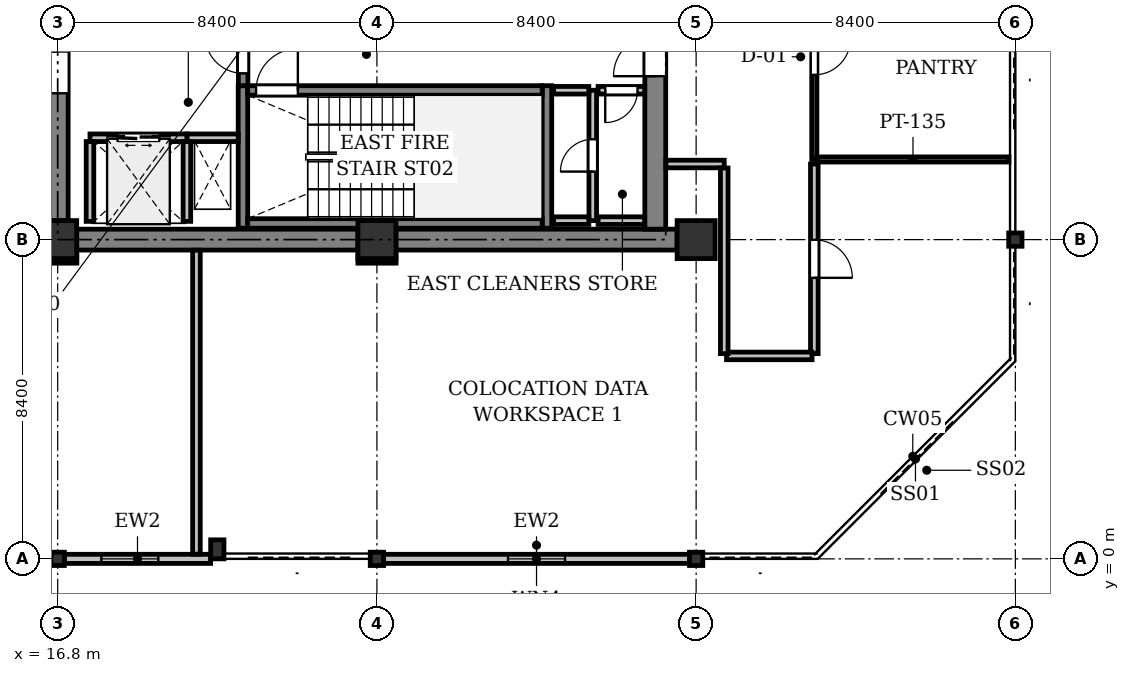
"""IFC4 building model, lengths in metres.
Left out: names, types, materials, properties, quantities, classifications, styles, units other than length and angle.
Written with IfcOpenShell. Run it as: python <this file> out.ifc"""

import sys

from ifc_helpers import new_model, si_unit, direction, frame, frame_2d, origin, origin_2d, place, context, subcontext, project, spatial, rectangle, i_section, extrude, element, fill, save


model = new_model("IFC4")
c1 = context("Model", 3, precision=1e-05, world=origin(), true_north=direction((0.0, 1.0)))
c2 = subcontext(c1, "Body", "Model", "MODEL_VIEW")
j1 = project(units=[si_unit("LENGTHUNIT", "METRE"), si_unit("PLANEANGLEUNIT", "RADIAN")], contexts=[c1])
p1 = place(None, origin())
s1 = spatial("IfcSite", under=j1, at=p1, CompositionType="ELEMENT")
p2 = place(p1, origin())
s2 = spatial("IfcBuilding", under=s1, at=p2, CompositionType="ELEMENT")
p3 = place(p2, frame((0.0, 0.0, 220.6)))
s3 = spatial("IfcBuildingStorey", under=s2, at=p3, CompositionType="ELEMENT", Elevation=220.6)
p4 = place(p3, frame((16.8, 0.0, 0.0), z_axis=(0.0, 0.0, 1.0), x_axis=(1.0, 0.0, 0.0)))
e1 = element("IfcColumn", 1, at=p4, inside=s3, PredefinedType="COLUMN", context=c2, shape_type="SweptSolid", body=[
    extrude(i_section(OverallWidth=0.35, OverallDepth=0.35, WebThickness=0.02, FlangeThickness=0.032, at=origin_2d()), origin(), (0.0, 0.0, 1.0), 4.1),
])
p5 = place(p3, frame((16.8, 8.4, 0.0), z_axis=(0.0, 0.0, 1.0), x_axis=(1.0, 0.0, 0.0)))
e2 = element("IfcColumn", 2, at=p5, inside=s3, PredefinedType="COLUMN", context=c2, shape_type="SweptSolid", body=[
    extrude(rectangle(XDim=1.0, YDim=1.0, at=origin_2d()), origin(), (0.0, 0.0, 1.0), 4.1),
])
p6 = place(p3, frame((25.2, 0.0, 0.0), z_axis=(0.0, 0.0, 1.0), x_axis=(1.0, 0.0, 0.0)))
e3 = element("IfcColumn", 3, at=p6, inside=s3, PredefinedType="COLUMN", context=c2, shape_type="SweptSolid", body=[
    extrude(i_section(OverallWidth=0.35, OverallDepth=0.35, WebThickness=0.02, FlangeThickness=0.032, at=origin_2d()), origin(), (0.0, 0.0, 1.0), 4.1),
])
p7 = place(p3, frame((25.2, 8.4, 0.0), z_axis=(0.0, 0.0, 1.0), x_axis=(1.0, 0.0, 0.0)))
e4 = element("IfcColumn", 4, at=p7, inside=s3, PredefinedType="COLUMN", context=c2, shape_type="SweptSolid", body=[
    extrude(rectangle(XDim=1.0, YDim=1.0, at=origin_2d()), origin(), (0.0, 0.0, 1.0), 4.1),
])
p8 = place(p3, frame((33.6, 0.0, 0.0), z_axis=(0.0, 0.0, 1.0), x_axis=(1.0, 0.0, 0.0)))
e5 = element("IfcColumn", 5, at=p8, inside=s3, PredefinedType="COLUMN", context=c2, shape_type="SweptSolid", body=[
    extrude(i_section(OverallWidth=0.35, OverallDepth=0.35, WebThickness=0.02, FlangeThickness=0.032, at=origin_2d()), origin(), (0.0, 0.0, 1.0), 4.1),
])
p9 = place(p3, frame((33.6, 8.4, 0.0), z_axis=(0.0, 0.0, 1.0), x_axis=(1.0, 0.0, 0.0)))
e6 = element("IfcColumn", 6, at=p9, inside=s3, PredefinedType="COLUMN", context=c2, shape_type="SweptSolid", body=[
    extrude(rectangle(XDim=1.0, YDim=1.0, at=origin_2d()), origin(), (0.0, 0.0, 1.0), 4.1),
])
p10 = place(p3, frame((42.0, 8.4, 0.0), z_axis=(0.0, 0.0, 1.0), x_axis=(1.0, 0.0, 0.0)))
e7 = element("IfcColumn", 7, at=p10, inside=s3, PredefinedType="COLUMN", context=c2, shape_type="SweptSolid", body=[
    extrude(i_section(OverallWidth=0.35, OverallDepth=0.35, WebThickness=0.02, FlangeThickness=0.032, at=origin_2d()), origin(), (0.0, 0.0, 1.0), 4.1),
])
p11 = place(p3, frame((21.0, 0.25, 0.0), z_axis=(0.0, 0.0, 1.0), x_axis=(1.0, 0.0, 0.0)))
e8 = element("IfcColumn", 8, at=p11, inside=s3, PredefinedType="PILASTER", context=c2, shape_type="SweptSolid", body=[
    extrude(rectangle(XDim=0.35, YDim=0.5, at=origin_2d()), origin(), (0.0, 0.0, 1.0), 4.1),
])
p12 = place(p3, frame((33.425, 0.0, 0.0), z_axis=(0.0, 0.0, 1.0), x_axis=(-1.0, 0.0, 0.0)))
e9 = element("IfcWall", 9, at=p12, inside=s3, PredefinedType="STANDARD", context=c2, shape_type="SweptSolid", body=[
    extrude(rectangle(XDim=8.05, YDim=0.24, at=frame_2d((4.025, 0.0))), origin(), (0.0, 0.0, 1.0), 3.525),
])
p13 = place(p12, frame((3.275, 0.0, 0.9)))
e10 = element("IfcOpeningElement", 10, at=p13, cuts=e9, PredefinedType="OPENING", context=c2, shape_type="SweptSolid", body=[
    extrude(rectangle(XDim=1.5, YDim=1.6, at=frame_2d((0.75, 0.8))), frame((0.0, 0.13, 0.0), z_axis=(0.0, -1.0, 0.0), x_axis=(1.0, 0.0, 0.0)), (0.0, 0.0, 1.0), 0.26),
])
p14 = place(p3, frame((20.825, 0.0, 0.0), z_axis=(0.0, 0.0, 1.0), x_axis=(-1.0, 0.0, 0.0)))
e11 = element("IfcWall", 11, at=p14, inside=s3, PredefinedType="STANDARD", context=c2, shape_type="SweptSolid", body=[
    extrude(rectangle(XDim=3.85, YDim=0.24, at=frame_2d((1.925, 0.0))), origin(), (0.0, 0.0, 1.0), 3.525),
])
p15 = place(p14, frame((1.377, 0.0, 0.9)))
e12 = element("IfcOpeningElement", 12, at=p15, cuts=e11, PredefinedType="OPENING", context=c2, shape_type="SweptSolid", body=[
    extrude(rectangle(XDim=1.5, YDim=1.6, at=frame_2d((0.75, 0.8))), frame((0.0, 0.13, 0.0), z_axis=(0.0, -1.0, 0.0), x_axis=(1.0, 0.0, 0.0)), (0.0, 0.0, 1.0), 0.26),
])
p16 = place(p3, frame((17.3, 8.4, 0.0), z_axis=(0.0, 0.0, 1.0), x_axis=(1.0, 0.0, 0.0)))
e13 = element("IfcWall", 13, at=p16, inside=s3, PredefinedType="SHEAR", context=c2, shape_type="SweptSolid", body=[
    extrude(rectangle(XDim=7.4, YDim=0.55, at=frame_2d((3.7, 0.0))), origin(), (0.0, 0.0, 1.0), 3.825),
])
p17 = place(p3, frame((25.7, 8.4, 0.0), z_axis=(0.0, 0.0, 1.0), x_axis=(1.0, 0.0, 0.0)))
e14 = element("IfcWall", 14, at=p17, inside=s3, PredefinedType="SHEAR", context=c2, shape_type="SweptSolid", body=[
    extrude(rectangle(XDim=7.4, YDim=0.55, at=frame_2d((3.7, 0.0))), origin(), (0.0, 0.0, 1.0), 3.825),
])
p18 = place(p3, frame((32.525, 8.675, 0.0), z_axis=(0.0, 0.0, 1.0), x_axis=(0.0, 1.0, 0.0)))
e15 = element("IfcWall", 15, at=p18, inside=s3, PredefinedType="SHEAR", context=c2, shape_type="SweptSolid", body=[
    extrude(rectangle(XDim=7.85, YDim=0.55, at=frame_2d((3.925, 0.0))), origin(), (0.0, 0.0, 1.0), 3.825),
])
p19 = place(p18, frame((4.025, 0.0, 0.0)))
e16 = element("IfcOpeningElement", 16, at=p19, cuts=e15, PredefinedType="OPENING", context=c2, shape_type="SweptSolid", body=[
    extrude(rectangle(XDim=1.1, YDim=2.15, at=frame_2d((0.55, 1.075))), frame((0.0, 0.285, 0.0), z_axis=(0.0, -1.0, 0.0), x_axis=(1.0, 0.0, 0.0)), (0.0, 0.0, 1.0), 0.57),
])
p20 = place(p3, frame((16.8, 8.9, 0.0), z_axis=(0.0, 0.0, 1.0), x_axis=(0.0, 1.0, 0.0)))
e17 = element("IfcWall", 17, at=p20, inside=s3, PredefinedType="SHEAR", context=c2, shape_type="SweptSolid", body=[
    extrude(rectangle(XDim=7.4, YDim=0.55, at=frame_2d((3.7, 0.0))), origin(), (0.0, 0.0, 1.0), 3.825),
])
p21 = place(p20, frame((3.35, 0.0, 0.0)))
e18 = element("IfcOpeningElement", 18, at=p21, cuts=e17, PredefinedType="OPENING", context=c2, shape_type="SweptSolid", body=[
    extrude(rectangle(XDim=1.1, YDim=2.15, at=frame_2d((0.55, 1.075))), frame((0.0, 0.285, 0.0), z_axis=(0.0, -1.0, 0.0), x_axis=(1.0, 0.0, 0.0)), (0.0, 0.0, 1.0), 0.57),
])
for number, where, z_axis, x_axis in (
    (19, (21.675, 8.7, 0.0), (0.0, 0.0, 1.0), (0.0, 1.0, 0.0)),
    (20, (29.675, 8.7, 0.0), (0.0, 0.0, 1.0), (0.0, 1.0, 0.0)),
):
    element("IfcWall", number, at=place(p3, frame(where, z_axis=z_axis, x_axis=x_axis)), inside=s3, PredefinedType="SHEAR", context=c2, shape_type="SweptSolid", body=[
        extrude(rectangle(XDim=3.75, YDim=0.25, at=frame_2d((1.875, 0.0))), origin(), (0.0, 0.0, 1.0), 3.825),
    ])
p22 = place(p3, frame((21.8, 8.825, 0.0), z_axis=(0.0, 0.0, 1.0), x_axis=(1.0, 0.0, 0.0)))
e21 = element("IfcWall", 21, at=p22, inside=s3, PredefinedType="SHEAR", context=c2, shape_type="SweptSolid", body=[
    extrude(rectangle(XDim=7.75, YDim=0.25, at=frame_2d((3.875, 0.0))), origin(), (0.0, 0.0, 1.0), 3.825),
])
p23 = place(p3, frame((21.8, 12.325, 0.0), z_axis=(0.0, 0.0, 1.0), x_axis=(1.0, 0.0, 0.0)))
e22 = element("IfcWall", 22, at=p23, inside=s3, PredefinedType="SHEAR", context=c2, shape_type="SweptSolid", body=[
    extrude(rectangle(XDim=7.75, YDim=0.25, at=frame_2d((3.875, 0.0))), origin(), (0.0, 0.0, 1.0), 3.825),
])
p24 = place(p23, frame((0.22, 0.0, 0.0)))
e23 = element("IfcOpeningElement", 23, at=p24, cuts=e22, PredefinedType="OPENING", context=c2, shape_type="SweptSolid", body=[
    extrude(rectangle(XDim=1.1, YDim=2.15, at=frame_2d((0.55, 1.075))), frame((0.0, 0.135, 0.0), z_axis=(0.0, -1.0, 0.0), x_axis=(1.0, 0.0, 0.0)), (0.0, 0.0, 1.0), 0.27),
])
p25 = place(p3, frame((20.2, 11.08, 0.0), z_axis=(0.0, 0.0, 1.0), x_axis=(1.0, 0.0, 0.0)))
e24 = element("IfcWall", 24, at=p25, inside=s3, PredefinedType="PARTITIONING", context=c2, shape_type="SweptSolid", body=[
    extrude(rectangle(XDim=1.35, YDim=0.2, at=frame_2d((0.675, 0.0))), origin(), (0.0, 0.0, 1.0), 3.825),
])
p26 = place(p3, frame((21.68, 12.45, 0.0), z_axis=(0.0, 0.0, 1.0), x_axis=(0.0, 1.0, 0.0)))
e25 = element("IfcWall", 25, at=p26, inside=s3, PredefinedType="SHEAR", context=c2, shape_type="SweptSolid", body=[
    extrude(rectangle(XDim=1.65, YDim=0.25, at=frame_2d((0.825, 0.0))), origin(), (0.0, 0.0, 1.0), 3.825),
])
p27 = place(p26, frame((0.325, 0.0, 0.0)))
e26 = element("IfcOpeningElement", 26, at=p27, cuts=e25, PredefinedType="OPENING", context=c2, shape_type="SweptSolid", body=[
    extrude(rectangle(XDim=1.0, YDim=2.15, at=frame_2d((0.5, 1.075))), frame((0.0, 0.135, 0.0), z_axis=(0.0, -1.0, 0.0), x_axis=(1.0, 0.0, 0.0)), (0.0, 0.0, 1.0), 0.27),
])
p28 = place(p3, frame((17.65, 11.08, 0.0), z_axis=(0.0, 0.0, 1.0), x_axis=(1.0, 0.0, 0.0)))
e27 = element("IfcWall", 27, at=p28, inside=s3, PredefinedType="PARTITIONING", context=c2, shape_type="SweptSolid", body=[
    extrude(rectangle(XDim=2.55, YDim=0.2, at=frame_2d((1.275, 0.0))), origin(), (0.0, 0.0, 1.0), 3.825),
])
p29 = place(p28, frame((0.725, 0.0, 0.0)))
e28 = element("IfcOpeningElement", 28, at=p29, cuts=e27, PredefinedType="OPENING", context=c2, shape_type="SweptSolid", body=[
    extrude(rectangle(XDim=1.1, YDim=2.2, at=frame_2d((0.55, 1.1))), frame((0.0, 0.11, 0.0), z_axis=(0.0, -1.0, 0.0), x_axis=(1.0, 0.0, 0.0)), (0.0, 0.0, 1.0), 0.22),
])
for number, where, z_axis, x_axis in (
    (29, (20.2, 8.88, 0.0), (0.0, 0.0, 1.0), (0.0, 1.0, 0.0)),
    (30, (17.65, 8.88, 0.0), (0.0, 0.0, 1.0), (0.0, 1.0, 0.0)),
):
    element("IfcWall", number, at=place(p3, frame(where, z_axis=z_axis, x_axis=x_axis)), inside=s3, PredefinedType="PARTITIONING", context=c2, shape_type="SweptSolid", body=[
        extrude(rectangle(XDim=2.1, YDim=0.2, at=frame_2d((1.05, 0.0))), origin(), (0.0, 0.0, 1.0), 3.825),
    ])
p30 = place(p3, frame((30.88, 8.9, 0.0), z_axis=(0.0, 0.0, 1.0), x_axis=(0.0, 1.0, 0.0)))
e31 = element("IfcWall", 31, at=p30, inside=s3, PredefinedType="PARTITIONING", context=c2, shape_type="SweptSolid", body=[
    extrude(rectangle(XDim=3.43, YDim=0.2, at=frame_2d((1.715, 0.0))), origin(), (0.0, 0.0, 1.0), 3.825),
])
p31 = place(p30, frame((1.29, 0.0, 0.0)))
e32 = element("IfcOpeningElement", 32, at=p31, cuts=e31, PredefinedType="OPENING", context=c2, shape_type="SweptSolid", body=[
    extrude(rectangle(XDim=0.85, YDim=2.15, at=frame_2d((0.425, 1.075))), frame((0.0, 0.11, 0.0), z_axis=(0.0, -1.0, 0.0), x_axis=(1.0, 0.0, 0.0)), (0.0, 0.0, 1.0), 0.22),
])
for number, where, z_axis, x_axis in (
    (33, (30.776, 12.33, 0.0), (0.0, 0.0, 1.0), (-1.0, 0.0, 0.0)),
    (34, (29.85, 8.9, 0.0), (0.0, 0.0, 1.0), (1.0, 0.0, 0.0)),
):
    element("IfcWall", number, at=place(p3, frame(where, z_axis=z_axis, x_axis=x_axis)), inside=s3, PredefinedType="PARTITIONING", context=c2, shape_type="SweptSolid", body=[
        extrude(rectangle(XDim=0.926, YDim=0.2, at=frame_2d((0.463, 0.0))), origin(), (0.0, 0.0, 1.0), 3.825),
    ])
p32 = place(p3, frame((32.246, 12.33, 0.0), z_axis=(0.0, 0.0, 1.0), x_axis=(-1.0, 0.0, 0.0)))
e35 = element("IfcWall", 35, at=p32, inside=s3, PredefinedType="PARTITIONING", context=c2, shape_type="SweptSolid", body=[
    extrude(rectangle(XDim=1.226, YDim=0.2, at=frame_2d((0.613, 0.0))), origin(), (0.0, 0.0, 1.0), 3.825),
])
p33 = place(p32, frame((0.188, 0.0, 0.0)))
e36 = element("IfcOpeningElement", 36, at=p33, cuts=e35, PredefinedType="OPENING", context=c2, shape_type="SweptSolid", body=[
    extrude(rectangle(XDim=0.85, YDim=2.15, at=frame_2d((0.425, 1.075))), frame((0.0, 0.11, 0.0), z_axis=(0.0, -1.0, 0.0), x_axis=(1.0, 0.0, 0.0)), (0.0, 0.0, 1.0), 0.22),
])
p34 = place(p3, frame((31.02, 8.9, 0.0), z_axis=(0.0, 0.0, 1.0), x_axis=(1.0, 0.0, 0.0)))
e37 = element("IfcWall", 37, at=p34, inside=s3, PredefinedType="PARTITIONING", context=c2, shape_type="SweptSolid", body=[
    extrude(rectangle(XDim=1.226, YDim=0.2, at=frame_2d((0.613, 0.0))), origin(), (0.0, 0.0, 1.0), 3.825),
])
p35 = place(p3, frame((36.71, 15.913, 0.0), z_axis=(0.0, 0.0, 1.0), x_axis=(0.0, -1.0, 0.0)))
e38 = element("IfcWall", 38, at=p35, inside=s3, PredefinedType="PARTITIONING", context=c2, shape_type="SweptSolid", body=[
    extrude(rectangle(XDim=5.404, YDim=0.135, at=frame_2d((2.702, 0.0))), origin(), (0.0, 0.0, 1.0), 3.825),
])
p36 = place(p35, frame((2.227, 0.0, 0.0)))
e39 = element("IfcOpeningElement", 39, at=p36, cuts=e38, PredefinedType="OPENING", context=c2, shape_type="SweptSolid", body=[
    extrude(rectangle(XDim=0.95, YDim=2.15, at=frame_2d((0.475, 1.075))), frame((0.0, 0.077, 0.0), z_axis=(0.0, -1.0, 0.0), x_axis=(1.0, 0.0, 0.0)), (0.0, 0.0, 1.0), 0.155),
])
p37 = place(p3, frame((36.781, 10.509, 0.0), z_axis=(0.0, 0.0, 1.0), x_axis=(1.0, 0.0, 0.0)))
e40 = element("IfcWall", 40, at=p37, inside=s3, PredefinedType="PARTITIONING", context=c2, shape_type="SweptSolid", body=[
    extrude(rectangle(XDim=5.05, YDim=0.135, at=frame_2d((2.525, 0.0))), origin(), (0.0, 0.0, 1.0), 3.518),
])
p38 = place(p3, frame((34.34, 10.389, 0.0), z_axis=(0.0, 0.0, 1.0), x_axis=(-1.0, 0.0, 0.0)))
e41 = element("IfcWall", 41, at=p38, inside=s3, PredefinedType="PARTITIONING", context=c2, shape_type="SweptSolid", body=[
    extrude(rectangle(XDim=1.536, YDim=0.2, at=frame_2d((0.768, 0.0))), origin(), (0.0, 0.0, 1.0), 3.371),
])
p39 = place(p3, frame((25.704, 7.88, 0.0), z_axis=(0.0, 0.0, 1.0), x_axis=(-0.999999881717, -0.000486381265, 0.0)))
e42 = element("IfcWall", 42, at=p39, inside=s3, PredefinedType="PARTITIONING", context=c2, shape_type="SweptSolid", body=[
    extrude(rectangle(XDim=1.004, YDim=0.2, at=frame_2d((0.502, 0.0))), origin(), (0.0, 0.0, 1.0), 3.371),
])
p40 = place(p3, frame((20.451, 8.121, 0.0), z_axis=(0.0, 0.0, 1.0), x_axis=(0.0, -1.0, 0.0)))
e43 = element("IfcWall", 43, at=p40, inside=s3, PredefinedType="PARTITIONING", context=c2, shape_type="SweptSolid", body=[
    extrude(rectangle(XDim=7.997, YDim=0.2, at=frame_2d((3.999, 0.0))), origin(), (0.0, 0.0, 1.0), 3.825),
])
p41 = place(p3, frame((36.71, 10.389, 0.0), z_axis=(0.0, 0.0, 1.0), x_axis=(0.0, -1.0, 0.0)))
e44 = element("IfcWall", 44, at=p41, inside=s3, PredefinedType="PARTITIONING", context=c2, shape_type="SweptSolid", body=[
    extrude(rectangle(XDim=4.989, YDim=0.2, at=frame_2d((2.495, 0.0))), origin(), (0.0, 0.0, 1.0), 3.365),
])
p42 = place(p41, frame((1.994, 0.0, 0.0)))
e45 = element("IfcOpeningElement", 45, at=p42, cuts=e44, PredefinedType="OPENING", context=c2, shape_type="SweptSolid", body=[
    extrude(rectangle(XDim=1.0, YDim=2.15, at=frame_2d((0.5, 1.075))), frame((0.0, 0.11, 0.0), z_axis=(0.0, -1.0, 0.0), x_axis=(1.0, 0.0, 0.0)), (0.0, 0.0, 1.0), 0.22),
])
p43 = place(p3, frame((36.65, 5.34, 0.0), z_axis=(0.0, 0.0, 1.0), x_axis=(-1.0, 0.0, 0.0)))
e46 = element("IfcWall", 46, at=p43, inside=s3, PredefinedType="PARTITIONING", context=c2, shape_type="SweptSolid", body=[
    extrude(rectangle(XDim=2.25, YDim=0.2, at=frame_2d((1.125, 0.0))), origin(), (0.0, 0.0, 1.0), 3.825),
])
p44 = place(p3, frame((34.34, 5.4, 0.0), z_axis=(0.0, 0.0, 1.0), x_axis=(0.0, 1.0, 0.0)))
e47 = element("IfcWall", 47, at=p44, inside=s3, PredefinedType="PARTITIONING", context=c2, shape_type="SweptSolid", body=[
    extrude(rectangle(XDim=4.885, YDim=0.2, at=frame_2d((2.443, 0.0))), origin(), (0.0, 0.0, 1.0), 3.365),
])
p45 = place(p3, frame((17.304, 7.88, 0.0), z_axis=(0.0, 0.0, 1.0), x_axis=(-0.999999881717, -0.000486381265, 0.0)))
e48 = element("IfcWall", 48, at=p45, inside=s3, PredefinedType="PARTITIONING", context=c2, shape_type="SweptSolid", body=[
    extrude(rectangle(XDim=1.004, YDim=0.2, at=frame_2d((0.502, 0.0))), origin(), (0.0, 0.0, 1.0), 3.371),
])
p46 = place(p13, origin())
e49 = element("IfcWindow", 49, at=p46, inside=s3, PartitioningType="SINGLE_PANEL", PredefinedType="WINDOW", context=c2, shape_type="SweptSolid", body=[
    extrude(rectangle(XDim=1.5, YDim=1.6, at=frame_2d((0.75, 0.8))), frame((0.0, 0.03, 0.0), z_axis=(0.0, -1.0, 0.0), x_axis=(1.0, 0.0, 0.0)), (0.0, 0.0, 1.0), 0.06),
])
fill(e10, e49)
p47 = place(p15, origin())
e50 = element("IfcWindow", 50, at=p47, inside=s3, PartitioningType="SINGLE_PANEL", PredefinedType="WINDOW", context=c2, shape_type="SweptSolid", body=[
    extrude(rectangle(XDim=1.5, YDim=1.6, at=frame_2d((0.75, 0.8))), frame((0.0, 0.03, 0.0), z_axis=(0.0, -1.0, 0.0), x_axis=(1.0, 0.0, 0.0)), (0.0, 0.0, 1.0), 0.06),
])
fill(e12, e50)
p48 = place(p19, origin())
e51 = element("IfcDoor", 51, at=p48, inside=s3, OperationType="SINGLE_SWING_LEFT", PredefinedType="DOOR", context=c2, shape_type="SweptSolid", body=[
    extrude(rectangle(XDim=1.1, YDim=2.15, at=frame_2d((0.55, 1.075))), frame((0.0, 0.025, 0.0), z_axis=(0.0, -1.0, 0.0), x_axis=(1.0, 0.0, 0.0)), (0.0, 0.0, 1.0), 0.05),
])
fill(e16, e51)
p49 = place(p21, origin())
e52 = element("IfcDoor", 52, at=p49, inside=s3, OperationType="SINGLE_SWING_RIGHT", PredefinedType="DOOR", context=c2, shape_type="SweptSolid", body=[
    extrude(rectangle(XDim=1.1, YDim=2.15, at=frame_2d((0.55, 1.075))), frame((0.0, 0.025, 0.0), z_axis=(0.0, -1.0, 0.0), x_axis=(1.0, 0.0, 0.0)), (0.0, 0.0, 1.0), 0.05),
])
fill(e18, e52)
p50 = place(p24, origin())
e53 = element("IfcDoor", 53, at=p50, inside=s3, OperationType="SINGLE_SWING_RIGHT", PredefinedType="DOOR", context=c2, shape_type="SweptSolid", body=[
    extrude(rectangle(XDim=1.1, YDim=2.15, at=frame_2d((0.55, 1.075))), frame((0.0, 0.025, 0.0), z_axis=(0.0, -1.0, 0.0), x_axis=(1.0, 0.0, 0.0)), (0.0, 0.0, 1.0), 0.05),
])
fill(e23, e53)
p51 = place(p27, origin())
e54 = element("IfcDoor", 54, at=p51, inside=s3, OperationType="SINGLE_SWING_RIGHT", PredefinedType="DOOR", context=c2, shape_type="SweptSolid", body=[
    extrude(rectangle(XDim=1.0, YDim=2.15, at=frame_2d((0.5, 1.075))), frame((0.0, 0.025, 0.0), z_axis=(0.0, -1.0, 0.0), x_axis=(1.0, 0.0, 0.0)), (0.0, 0.0, 1.0), 0.05),
])
fill(e26, e54)
p52 = place(p29, origin())
e55 = element("IfcDoor", 55, at=p52, inside=s3, OperationType="DOUBLE_DOOR_SLIDING", PredefinedType="DOOR", context=c2, shape_type="SweptSolid", body=[
    extrude(rectangle(XDim=1.1, YDim=2.2, at=frame_2d((0.55, 1.1))), frame((0.0, 0.025, 0.0), z_axis=(0.0, -1.0, 0.0), x_axis=(1.0, 0.0, 0.0)), (0.0, 0.0, 1.0), 0.05),
])
fill(e28, e55)
p53 = place(p31, origin())
e56 = element("IfcDoor", 56, at=p53, inside=s3, OperationType="SINGLE_SWING_LEFT", PredefinedType="DOOR", context=c2, shape_type="SweptSolid", body=[
    extrude(rectangle(XDim=0.85, YDim=2.15, at=frame_2d((0.425, 1.075))), frame((0.0, 0.025, 0.0), z_axis=(0.0, -1.0, 0.0), x_axis=(1.0, 0.0, 0.0)), (0.0, 0.0, 1.0), 0.05),
])
fill(e32, e56)
p54 = place(p33, origin())
e57 = element("IfcDoor", 57, at=p54, inside=s3, OperationType="SINGLE_SWING_RIGHT", PredefinedType="DOOR", context=c2, shape_type="SweptSolid", body=[
    extrude(rectangle(XDim=0.85, YDim=2.15, at=frame_2d((0.425, 1.075))), frame((0.0, 0.025, 0.0), z_axis=(0.0, -1.0, 0.0), x_axis=(1.0, 0.0, 0.0)), (0.0, 0.0, 1.0), 0.05),
])
fill(e36, e57)
p55 = place(p36, origin())
e58 = element("IfcDoor", 58, at=p55, inside=s3, OperationType="SINGLE_SWING_LEFT", PredefinedType="DOOR", context=c2, shape_type="SweptSolid", body=[
    extrude(rectangle(XDim=0.95, YDim=2.15, at=frame_2d((0.475, 1.075))), frame((0.0, 0.025, 0.0), z_axis=(0.0, -1.0, 0.0), x_axis=(1.0, 0.0, 0.0)), (0.0, 0.0, 1.0), 0.05),
])
fill(e39, e58)
p56 = place(p42, origin())
e59 = element("IfcDoor", 59, at=p56, inside=s3, OperationType="SINGLE_SWING_RIGHT", PredefinedType="DOOR", context=c2, shape_type="SweptSolid", body=[
    extrude(rectangle(XDim=1.0, YDim=2.15, at=frame_2d((0.5, 1.075))), frame((0.0, 0.025, 0.0), z_axis=(0.0, -1.0, 0.0), x_axis=(1.0, 0.0, 0.0)), (0.0, 0.0, 1.0), 0.05),
])
fill(e45, e59)
save(model, sys.argv[1])
